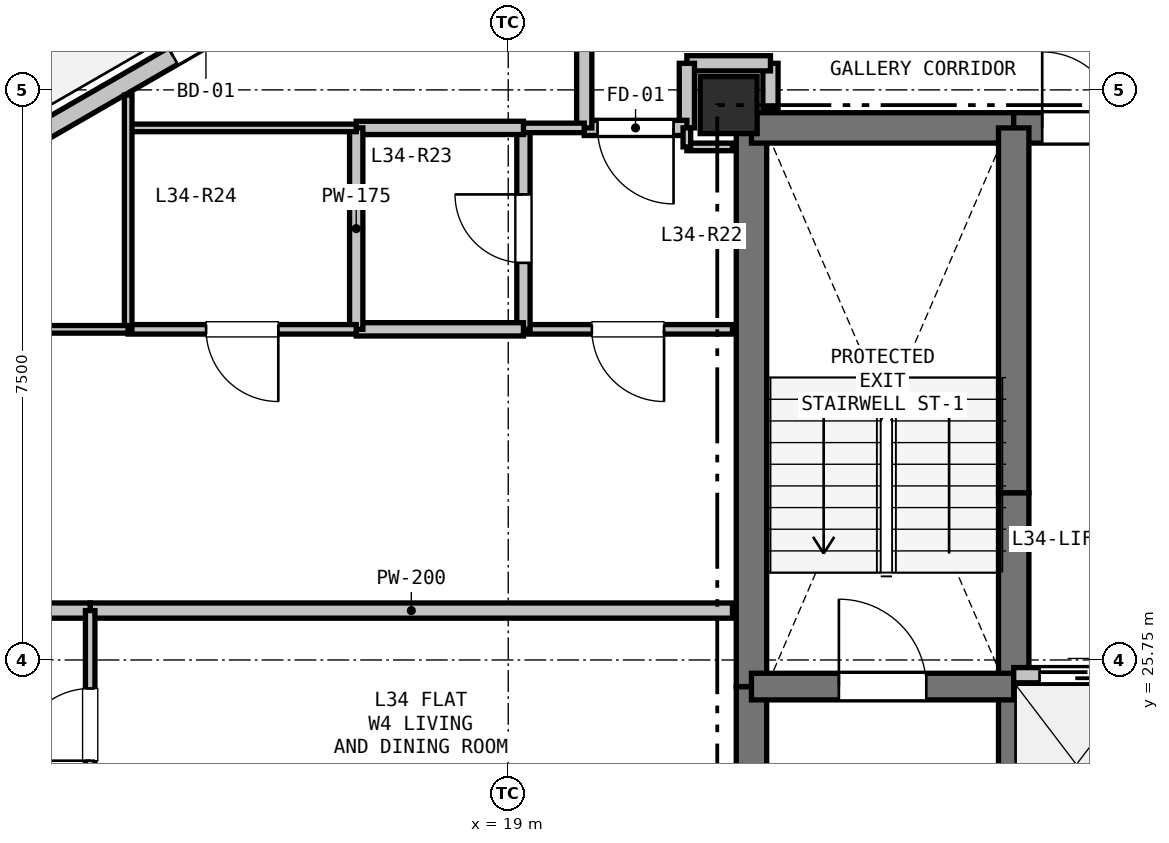
"""IFC4 building model, lengths in metres.
Left out: names, types, materials, properties, quantities, classifications, styles, units other than length and angle.
Written with IfcOpenShell. Run it as: python <this file> out.ifc"""

import sys

from ifc_helpers import new_model, si_unit, direction, frame, frame_2d, origin, origin_2d, place, context, subcontext, project, spatial, rectangle, extrude, element, fill, save


model = new_model("IFC4")
c1 = context("Model", 3, precision=1e-05, world=origin(), true_north=direction((0.0, 1.0)))
c2 = subcontext(c1, "Body", "Model", "MODEL_VIEW")
j1 = project(units=[si_unit("LENGTHUNIT", "METRE"), si_unit("PLANEANGLEUNIT", "RADIAN")], contexts=[c1])
p1 = place(None, origin())
s1 = spatial("IfcSite", under=j1, at=p1, CompositionType="ELEMENT")
p2 = place(p1, origin())
s2 = spatial("IfcBuilding", under=s1, at=p2, CompositionType="ELEMENT")
p3 = place(p2, frame((0.0, 0.0, 124.5)))
s3 = spatial("IfcBuildingStorey", under=s2, at=p3, CompositionType="ELEMENT", Elevation=124.5)
p4 = place(p3, frame((21.9, 33.05, 0.0), z_axis=(0.0, 0.0, 1.0), x_axis=(1.0, 0.0, 0.0)))
e1 = element("IfcColumn", 1, at=p4, inside=s3, PredefinedType="COLUMN", context=c2, shape_type="SweptSolid", body=[
    extrude(rectangle(XDim=0.75, YDim=0.75, at=origin_2d()), origin(), (0.0, 0.0, 1.0), 3.3),
])
p5 = place(p3, frame((6.69, 29.134, 0.0), z_axis=(0.0, 0.0, 1.0), x_axis=(0.866027848477, 0.499995765644, 0.0)))
e2 = element("IfcWall", 2, at=p5, inside=s3, PredefinedType="SOLIDWALL", context=c2, shape_type="SweptSolid", body=[
    extrude(rectangle(XDim=11.186, YDim=0.25, at=frame_2d((5.593, 0.0))), origin(), (0.0, 0.0, 1.0), 2.68),
])
p6 = place(p5, frame((9.122, 0.0, 0.0)))
e3 = element("IfcOpeningElement", 3, at=p6, cuts=e2, PredefinedType="OPENING", context=c2, shape_type="SweptSolid", body=[
    extrude(rectangle(XDim=1.0, YDim=2.1, at=frame_2d((0.5, 1.05))), frame((0.0, 0.135, 0.0), z_axis=(0.0, -1.0, 0.0), x_axis=(1.0, 0.0, 0.0)), (0.0, 0.0, 1.0), 0.27),
])
p7 = place(p5, frame((0.86, 0.0, 0.9)))
e4 = element("IfcOpeningElement", 4, at=p7, cuts=e2, PredefinedType="OPENING", context=c2, shape_type="SweptSolid", body=[
    extrude(rectangle(XDim=0.9, YDim=1.4, at=frame_2d((0.45, 0.7))), frame((0.0, 0.135, 0.0), z_axis=(0.0, -1.0, 0.0), x_axis=(1.0, 0.0, 0.0)), (0.0, 0.0, 1.0), 0.27),
])
p8 = place(p3, frame((16.378, 18.773, 0.0), z_axis=(0.0, 0.0, 1.0), x_axis=(-0.866027848477, 0.499995765644, 0.0)))
e5 = element("IfcWall", 5, at=p8, inside=s3, PredefinedType="SOLIDWALL", context=c2, shape_type="SweptSolid", body=[
    extrude(rectangle(XDim=11.186, YDim=0.25, at=frame_2d((5.593, 0.0))), origin(), (0.0, 0.0, 1.0), 2.68),
])
p9 = place(p8, frame((6.757, 0.0, 0.9)))
e6 = element("IfcOpeningElement", 6, at=p9, cuts=e5, PredefinedType="OPENING", context=c2, shape_type="SweptSolid", body=[
    extrude(rectangle(XDim=1.2, YDim=1.4, at=frame_2d((0.6, 0.7))), frame((0.0, 0.135, 0.0), z_axis=(0.0, -1.0, 0.0), x_axis=(1.0, 0.0, 0.0)), (0.0, 0.0, 1.0), 0.27),
])
p10 = place(p3, frame((22.2, 20.75, 0.0), z_axis=(0.0, 0.0, 1.0), x_axis=(0.0, 1.0, 0.0)))
e7 = element("IfcWall", 7, at=p10, inside=s3, PredefinedType="SHEAR", context=c2, shape_type="SweptSolid", body=[
    extrude(rectangle(XDim=4.65, YDim=0.4, at=frame_2d((2.325, 0.0))), origin(), (0.0, 0.0, 1.0), 3.06),
])
p11 = place(p3, frame((22.2, 25.4, 0.0), z_axis=(0.0, 0.0, 1.0), x_axis=(0.0, 1.0, 0.0)))
e8 = element("IfcWall", 8, at=p11, inside=s3, PredefinedType="SHEAR", context=c2, shape_type="SweptSolid", body=[
    extrude(rectangle(XDim=7.35, YDim=0.4, at=frame_2d((3.675, 0.0))), origin(), (0.0, 0.0, 1.0), 3.06),
])
p12 = place(p3, frame((22.2, 32.75, 0.0), z_axis=(0.0, 0.0, 1.0), x_axis=(1.0, 0.0, 0.0)))
e9 = element("IfcWall", 9, at=p12, inside=s3, PredefinedType="SHEAR", context=c2, shape_type="SweptSolid", body=[
    extrude(rectangle(XDim=3.45, YDim=0.4, at=frame_2d((1.725, 0.0))), origin(), (0.0, 0.0, 1.0), 3.06),
])
p13 = place(p3, frame((25.65, 32.75, 0.0), z_axis=(0.0, 0.0, 1.0), x_axis=(1.0, 0.0, 0.0)))
e10 = element("IfcWall", 10, at=p13, inside=s3, PredefinedType="SHEAR", context=c2, shape_type="SweptSolid", body=[
    extrude(rectangle(XDim=1.75, YDim=0.4, at=frame_2d((0.875, 0.0))), origin(), (0.0, 0.0, 1.0), 3.06),
])
p14 = place(p13, frame((0.375, 0.0, 0.0)))
e11 = element("IfcOpeningElement", 11, at=p14, cuts=e10, PredefinedType="OPENING", context=c2, shape_type="SweptSolid", body=[
    extrude(rectangle(XDim=1.0, YDim=2.15, at=frame_2d((0.5, 1.075))), frame((0.0, 0.21, 0.0), z_axis=(0.0, -1.0, 0.0), x_axis=(1.0, 0.0, 0.0)), (0.0, 0.0, 1.0), 0.42),
])
p15 = place(p3, frame((25.65, 22.75, 0.0), z_axis=(0.0, 0.0, 1.0), x_axis=(0.0, 1.0, 0.0)))
e12 = element("IfcWall", 12, at=p15, inside=s3, PredefinedType="SHEAR", context=c2, shape_type="SweptSolid", body=[
    extrude(rectangle(XDim=2.8, YDim=0.4, at=frame_2d((1.4, 0.0))), origin(), (0.0, 0.0, 1.0), 3.06),
])
p16 = place(p3, frame((25.65, 25.55, 0.0), z_axis=(0.0, 0.0, 1.0), x_axis=(0.0, 1.0, 0.0)))
e13 = element("IfcWall", 13, at=p16, inside=s3, PredefinedType="SHEAR", context=c2, shape_type="SweptSolid", body=[
    extrude(rectangle(XDim=2.4, YDim=0.4, at=frame_2d((1.2, 0.0))), origin(), (0.0, 0.0, 1.0), 3.06),
])
p17 = place(p3, frame((25.65, 27.95, 0.0), z_axis=(0.0, 0.0, 1.0), x_axis=(0.0, 1.0, 0.0)))
e14 = element("IfcWall", 14, at=p17, inside=s3, PredefinedType="SHEAR", context=c2, shape_type="SweptSolid", body=[
    extrude(rectangle(XDim=4.8, YDim=0.4, at=frame_2d((2.4, 0.0))), origin(), (0.0, 0.0, 1.0), 3.06),
])
p18 = place(p3, frame((22.2, 25.4, 0.0), z_axis=(0.0, 0.0, 1.0), x_axis=(1.0, 0.0, 0.0)))
e15 = element("IfcWall", 15, at=p18, inside=s3, PredefinedType="SHEAR", context=c2, shape_type="SweptSolid", body=[
    extrude(rectangle(XDim=3.45, YDim=0.35, at=frame_2d((1.725, 0.0))), origin(), (0.0, 0.0, 1.0), 3.06),
])
p19 = place(p18, frame((1.15, 0.0, 0.0)))
e16 = element("IfcOpeningElement", 16, at=p19, cuts=e15, PredefinedType="OPENING", context=c2, shape_type="SweptSolid", body=[
    extrude(rectangle(XDim=1.15, YDim=2.15, at=frame_2d((0.575, 1.075))), frame((0.0, 0.185, 0.0), z_axis=(0.0, -1.0, 0.0), x_axis=(1.0, 0.0, 0.0)), (0.0, 0.0, 1.0), 0.37),
])
p20 = place(p3, frame((25.65, 25.55, 0.0), z_axis=(0.0, 0.0, 1.0), x_axis=(1.0, 0.0, 0.0)))
e17 = element("IfcWall", 17, at=p20, inside=s3, PredefinedType="PARTITIONING", context=c2, shape_type="SweptSolid", body=[
    extrude(rectangle(XDim=4.95, YDim=0.2, at=frame_2d((2.475, 0.0))), origin(), (0.0, 0.0, 1.0), 3.06),
])
p21 = place(p20, frame((0.34, 0.0, 0.0)))
e18 = element("IfcOpeningElement", 18, at=p21, cuts=e17, PredefinedType="OPENING", context=c2, shape_type="SweptSolid", body=[
    extrude(rectangle(XDim=1.1, YDim=2.15, at=frame_2d((0.55, 1.075))), frame((0.0, 0.11, 0.0), z_axis=(0.0, -1.0, 0.0), x_axis=(1.0, 0.0, 0.0)), (0.0, 0.0, 1.0), 0.22),
])
p22 = place(p20, frame((1.99, 0.0, 0.0)))
e19 = element("IfcOpeningElement", 19, at=p22, cuts=e17, PredefinedType="OPENING", context=c2, shape_type="SweptSolid", body=[
    extrude(rectangle(XDim=1.1, YDim=2.15, at=frame_2d((0.55, 1.075))), frame((0.0, 0.11, 0.0), z_axis=(0.0, -1.0, 0.0), x_axis=(1.0, 0.0, 0.0)), (0.0, 0.0, 1.0), 0.22),
])
p23 = place(p20, frame((3.64, 0.0, 0.0)))
e20 = element("IfcOpeningElement", 20, at=p23, cuts=e17, PredefinedType="OPENING", context=c2, shape_type="SweptSolid", body=[
    extrude(rectangle(XDim=1.1, YDim=2.15, at=frame_2d((0.55, 1.075))), frame((0.0, 0.11, 0.0), z_axis=(0.0, -1.0, 0.0), x_axis=(1.0, 0.0, 0.0)), (0.0, 0.0, 1.0), 0.22),
])
p24 = place(p3, frame((22.45, 33.0, 0.0), z_axis=(0.0, 0.0, 1.0), x_axis=(0.0, 1.0, 0.0)))
e21 = element("IfcWall", 21, at=p24, inside=s3, PredefinedType="PARTITIONING", context=c2, shape_type="SweptSolid", body=[
    extrude(rectangle(XDim=0.6, YDim=0.2, at=frame_2d((0.3, 0.0))), origin(), (0.0, 0.0, 1.0), 2.508),
])
p25 = place(p3, frame((22.45, 33.6, 0.0), z_axis=(0.0, 0.0, 1.0), x_axis=(-1.0, 0.0, 0.0)))
e22 = element("IfcWall", 22, at=p25, inside=s3, PredefinedType="PARTITIONING", context=c2, shape_type="SweptSolid", body=[
    extrude(rectangle(XDim=1.1, YDim=0.2, at=frame_2d((0.55, 0.0))), origin(), (0.0, 0.0, 1.0), 3.06),
])
p26 = place(p3, frame((21.35, 33.6, 0.0), z_axis=(0.0, 0.0, 1.0), x_axis=(0.0, -1.0, 0.0)))
e23 = element("IfcWall", 23, at=p26, inside=s3, PredefinedType="PARTITIONING", context=c2, shape_type="SweptSolid", body=[
    extrude(rectangle(XDim=0.85, YDim=0.2, at=frame_2d((0.425, 0.0))), origin(), (0.0, 0.0, 1.0), 2.433),
])
p27 = place(p3, frame((21.35, 32.75, 0.0), z_axis=(0.0, 0.0, 1.0), x_axis=(-1.0, 0.0, 0.0)))
e24 = element("IfcWall", 24, at=p27, inside=s3, PredefinedType="PARTITIONING", context=c2, shape_type="SweptSolid", body=[
    extrude(rectangle(XDim=1.35, YDim=0.2, at=frame_2d((0.675, 0.0))), origin(), (0.0, 0.0, 1.0), 2.433),
])
p28 = place(p27, frame((0.175, 0.0, 0.0)))
e25 = element("IfcOpeningElement", 25, at=p28, cuts=e24, PredefinedType="OPENING", context=c2, shape_type="SweptSolid", body=[
    extrude(rectangle(XDim=1.0, YDim=2.15, at=frame_2d((0.5, 1.075))), frame((0.0, 0.11, 0.0), z_axis=(0.0, -1.0, 0.0), x_axis=(1.0, 0.0, 0.0)), (0.0, 0.0, 1.0), 0.22),
])
p29 = place(p3, frame((20.0, 32.75, 0.0), z_axis=(0.0, 0.0, 1.0), x_axis=(0.0, 1.0, 0.0)))
e26 = element("IfcWall", 26, at=p29, inside=s3, PredefinedType="PARTITIONING", context=c2, shape_type="SweptSolid", body=[
    extrude(rectangle(XDim=2.6, YDim=0.2, at=frame_2d((1.3, 0.0))), origin(), (0.0, 0.0, 1.0), 2.433),
])
p30 = place(p3, frame((21.35, 32.5, 0.0), z_axis=(0.0, 0.0, 1.0), x_axis=(1.0, 0.0, 0.0)))
e27 = element("IfcWall", 27, at=p30, inside=s3, PredefinedType="PARTITIONING", context=c2, shape_type="SweptSolid", body=[
    extrude(rectangle(XDim=0.6, YDim=0.1, at=frame_2d((0.3, 0.0))), origin(), (0.0, 0.0, 1.0), 2.508),
])
p31 = place(p3, frame((21.95, 30.1, 0.0), z_axis=(0.0, 0.0, 1.0), x_axis=(-1.0, 0.0, 0.0)))
e28 = element("IfcWall", 28, at=p31, inside=s3, PredefinedType="PARTITIONING", context=c2, shape_type="SweptSolid", body=[
    extrude(rectangle(XDim=2.75, YDim=0.125, at=frame_2d((1.375, 0.0))), origin(), (0.0, 0.0, 1.0), 2.508),
])
p32 = place(p31, frame((0.9, 0.0, 0.0)))
e29 = element("IfcOpeningElement", 29, at=p32, cuts=e28, PredefinedType="OPENING", context=c2, shape_type="SweptSolid", body=[
    extrude(rectangle(XDim=0.95, YDim=2.1, at=frame_2d((0.475, 1.05))), frame((0.0, 0.073, 0.0), z_axis=(0.0, -1.0, 0.0), x_axis=(1.0, 0.0, 0.0)), (0.0, 0.0, 1.0), 0.145),
])
p33 = place(p3, frame((19.2, 30.1, 0.0), z_axis=(0.0, 0.0, 1.0), x_axis=(0.0, 1.0, 0.0)))
e30 = element("IfcWall", 30, at=p33, inside=s3, PredefinedType="PLUMBINGWALL", context=c2, shape_type="SweptSolid", body=[
    extrude(rectangle(XDim=2.65, YDim=0.175, at=frame_2d((1.325, 0.0))), origin(), (0.0, 0.0, 1.0), 2.433),
])
p34 = place(p33, frame((0.875, 0.0, 0.0)))
e31 = element("IfcOpeningElement", 31, at=p34, cuts=e30, PredefinedType="OPENING", context=c2, shape_type="SweptSolid", body=[
    extrude(rectangle(XDim=0.9, YDim=2.1, at=frame_2d((0.45, 1.05))), frame((0.0, 0.097, 0.0), z_axis=(0.0, -1.0, 0.0), x_axis=(1.0, 0.0, 0.0)), (0.0, 0.0, 1.0), 0.195),
])
p35 = place(p3, frame((19.2, 32.75, 0.0), z_axis=(0.0, 0.0, 1.0), x_axis=(1.0, 0.0, 0.0)))
e32 = element("IfcWall", 32, at=p35, inside=s3, PredefinedType="PARTITIONING", context=c2, shape_type="SweptSolid", body=[
    extrude(rectangle(XDim=0.8, YDim=0.125, at=frame_2d((0.4, 0.0))), origin(), (0.0, 0.0, 1.0), 2.433),
])
p36 = place(p3, frame((21.35, 32.75, 0.0), z_axis=(0.0, 0.0, 1.0), x_axis=(0.0, -1.0, 0.0)))
e33 = element("IfcWall", 33, at=p36, inside=s3, PredefinedType="PARTITIONING", context=c2, shape_type="SweptSolid", body=[
    extrude(rectangle(XDim=0.25, YDim=0.1, at=frame_2d((0.125, 0.0))), origin(), (0.0, 0.0, 1.0), 3.06),
])
p37 = place(p3, frame((17.0, 32.75, 0.0), z_axis=(0.0, 0.0, 1.0), x_axis=(1.0, 0.0, 0.0)))
e34 = element("IfcWall", 34, at=p37, inside=s3, PredefinedType="PLUMBINGWALL", context=c2, shape_type="SweptSolid", body=[
    extrude(rectangle(XDim=2.2, YDim=0.175, at=frame_2d((1.1, 0.0))), origin(), (0.0, 0.0, 1.0), 2.433),
])
p38 = place(p3, frame((19.2, 30.1, 0.0), z_axis=(0.0, 0.0, 1.0), x_axis=(-1.0, 0.0, 0.0)))
e35 = element("IfcWall", 35, at=p38, inside=s3, PredefinedType="PLUMBINGWALL", context=c2, shape_type="SweptSolid", body=[
    extrude(rectangle(XDim=2.2, YDim=0.175, at=frame_2d((1.1, 0.0))), origin(), (0.0, 0.0, 1.0), 3.06),
])
p39 = place(p3, frame((17.0, 30.1, 0.0), z_axis=(0.0, 0.0, 1.0), x_axis=(0.0, 1.0, 0.0)))
e36 = element("IfcWall", 36, at=p39, inside=s3, PredefinedType="PLUMBINGWALL", context=c2, shape_type="SweptSolid", body=[
    extrude(rectangle(XDim=2.65, YDim=0.175, at=frame_2d((1.325, 0.0))), origin(), (0.0, 0.0, 1.0), 2.433),
])
p40 = place(p3, frame((14.0, 32.75, 0.0), z_axis=(0.0, 0.0, 1.0), x_axis=(1.0, 0.0, 0.0)))
e37 = element("IfcWall", 37, at=p40, inside=s3, PredefinedType="PARTITIONING", context=c2, shape_type="SweptSolid", body=[
    extrude(rectangle(XDim=3.0, YDim=0.1, at=frame_2d((1.5, 0.0))), origin(), (0.0, 0.0, 1.0), 2.365),
])
p41 = place(p3, frame((17.0, 30.1, 0.0), z_axis=(0.0, 0.0, 1.0), x_axis=(-1.0, 0.0, 0.0)))
e38 = element("IfcWall", 38, at=p41, inside=s3, PredefinedType="PARTITIONING", context=c2, shape_type="SweptSolid", body=[
    extrude(rectangle(XDim=3.0, YDim=0.125, at=frame_2d((1.5, 0.0))), origin(), (0.0, 0.0, 1.0), 3.06),
])
p42 = place(p41, frame((1.025, 0.0, 0.0)))
e39 = element("IfcOpeningElement", 39, at=p42, cuts=e38, PredefinedType="OPENING", context=c2, shape_type="SweptSolid", body=[
    extrude(rectangle(XDim=0.95, YDim=2.1, at=frame_2d((0.475, 1.05))), frame((0.0, 0.073, 0.0), z_axis=(0.0, -1.0, 0.0), x_axis=(1.0, 0.0, 0.0)), (0.0, 0.0, 1.0), 0.145),
])
p43 = place(p3, frame((14.0, 30.1, 0.0), z_axis=(0.0, 0.0, 1.0), x_axis=(0.0, 1.0, 0.0)))
e40 = element("IfcWall", 40, at=p43, inside=s3, PredefinedType="PARTITIONING", context=c2, shape_type="SweptSolid", body=[
    extrude(rectangle(XDim=3.082, YDim=0.1, at=frame_2d((1.541, 0.0))), origin(), (0.0, 0.0, 1.0), 2.365),
])
p44 = place(p3, frame((8.635, 30.1, 0.0), z_axis=(0.0, 0.0, 1.0), x_axis=(1.0, 0.0, 0.0)))
e41 = element("IfcWall", 41, at=p44, inside=s3, PredefinedType="PARTITIONING", context=c2, shape_type="SweptSolid", body=[
    extrude(rectangle(XDim=5.365, YDim=0.1, at=frame_2d((2.683, 0.0))), origin(), (0.0, 0.0, 1.0), 2.725),
])
p45 = place(p3, frame((21.95, 26.4, 0.0), z_axis=(0.0, 0.0, 1.0), x_axis=(-1.0, 0.0, 0.0)))
e42 = element("IfcWall", 42, at=p45, inside=s3, PredefinedType="PARTITIONING", context=c2, shape_type="SweptSolid", body=[
    extrude(rectangle(XDim=8.45, YDim=0.2, at=frame_2d((4.225, 0.0))), origin(), (0.0, 0.0, 1.0), 2.508),
])
p46 = place(p3, frame((13.5, 26.4, 0.0), z_axis=(0.0, 0.0, 1.0), x_axis=(-1.0, 0.0, 0.0)))
e43 = element("IfcWall", 43, at=p46, inside=s3, PredefinedType="PARTITIONING", context=c2, shape_type="SweptSolid", body=[
    extrude(rectangle(XDim=6.791, YDim=0.2, at=frame_2d((3.396, 0.0))), origin(), (0.0, 0.0, 1.0), 2.725),
])
p47 = place(p3, frame((13.5, 23.4, 0.0), z_axis=(0.0, 0.0, 1.0), x_axis=(0.0, 1.0, 0.0)))
e44 = element("IfcWall", 44, at=p47, inside=s3, PredefinedType="PARTITIONING", context=c2, shape_type="SweptSolid", body=[
    extrude(rectangle(XDim=3.0, YDim=0.125, at=frame_2d((1.5, 0.0))), origin(), (0.0, 0.0, 1.0), 3.06),
])
p48 = place(p47, frame((1.025, 0.0, 0.0)))
e45 = element("IfcOpeningElement", 45, at=p48, cuts=e44, PredefinedType="OPENING", context=c2, shape_type="SweptSolid", body=[
    extrude(rectangle(XDim=0.95, YDim=2.1, at=frame_2d((0.475, 1.05))), frame((0.0, 0.073, 0.0), z_axis=(0.0, -1.0, 0.0), x_axis=(1.0, 0.0, 0.0)), (0.0, 0.0, 1.0), 0.145),
])
p49 = place(p6, origin())
e46 = element("IfcDoor", 46, at=p49, inside=s3, OperationType="SINGLE_SWING_LEFT", PredefinedType="DOOR", context=c2, shape_type="SweptSolid", body=[
    extrude(rectangle(XDim=1.0, YDim=2.1, at=frame_2d((0.5, 1.05))), frame((0.0, 0.025, 0.0), z_axis=(0.0, -1.0, 0.0), x_axis=(1.0, 0.0, 0.0)), (0.0, 0.0, 1.0), 0.05),
])
fill(e3, e46)
p50 = place(p21, origin())
e47 = element("IfcDoor", 47, at=p50, inside=s3, OperationType="SLIDING_TO_LEFT", PredefinedType="DOOR", context=c2, shape_type="SweptSolid", body=[
    extrude(rectangle(XDim=1.1, YDim=2.15, at=frame_2d((0.55, 1.075))), frame((0.0, 0.025, 0.0), z_axis=(0.0, -1.0, 0.0), x_axis=(1.0, 0.0, 0.0)), (0.0, 0.0, 1.0), 0.05),
])
fill(e18, e47)
p51 = place(p14, origin())
e48 = element("IfcDoor", 48, at=p51, inside=s3, OperationType="SINGLE_SWING_LEFT", PredefinedType="DOOR", context=c2, shape_type="SweptSolid", body=[
    extrude(rectangle(XDim=1.0, YDim=2.15, at=frame_2d((0.5, 1.075))), frame((0.0, 0.025, 0.0), z_axis=(0.0, -1.0, 0.0), x_axis=(1.0, 0.0, 0.0)), (0.0, 0.0, 1.0), 0.05),
])
fill(e11, e48)
p52 = place(p19, origin())
e49 = element("IfcDoor", 49, at=p52, inside=s3, OperationType="SINGLE_SWING_LEFT", PredefinedType="DOOR", context=c2, shape_type="SweptSolid", body=[
    extrude(rectangle(XDim=1.15, YDim=2.15, at=frame_2d((0.575, 1.075))), frame((0.0, 0.025, 0.0), z_axis=(0.0, -1.0, 0.0), x_axis=(1.0, 0.0, 0.0)), (0.0, 0.0, 1.0), 0.05),
])
fill(e16, e49)
p53 = place(p28, origin())
e50 = element("IfcDoor", 50, at=p53, inside=s3, OperationType="SINGLE_SWING_LEFT", PredefinedType="DOOR", context=c2, shape_type="SweptSolid", body=[
    extrude(rectangle(XDim=1.0, YDim=2.15, at=frame_2d((0.5, 1.075))), frame((0.0, 0.025, 0.0), z_axis=(0.0, -1.0, 0.0), x_axis=(1.0, 0.0, 0.0)), (0.0, 0.0, 1.0), 0.05),
])
fill(e25, e50)
p54 = place(p34, origin())
e51 = element("IfcDoor", 51, at=p54, inside=s3, OperationType="SINGLE_SWING_RIGHT", PredefinedType="DOOR", context=c2, shape_type="SweptSolid", body=[
    extrude(rectangle(XDim=0.9, YDim=2.1, at=frame_2d((0.45, 1.05))), frame((0.0, 0.025, 0.0), z_axis=(0.0, -1.0, 0.0), x_axis=(1.0, 0.0, 0.0)), (0.0, 0.0, 1.0), 0.05),
])
fill(e31, e51)
p55 = place(p32, origin())
e52 = element("IfcDoor", 52, at=p55, inside=s3, OperationType="SINGLE_SWING_LEFT", PredefinedType="DOOR", context=c2, shape_type="SweptSolid", body=[
    extrude(rectangle(XDim=0.95, YDim=2.1, at=frame_2d((0.475, 1.05))), frame((0.0, 0.025, 0.0), z_axis=(0.0, -1.0, 0.0), x_axis=(1.0, 0.0, 0.0)), (0.0, 0.0, 1.0), 0.05),
])
fill(e29, e52)
p56 = place(p42, origin())
e53 = element("IfcDoor", 53, at=p56, inside=s3, OperationType="SINGLE_SWING_LEFT", PredefinedType="DOOR", context=c2, shape_type="SweptSolid", body=[
    extrude(rectangle(XDim=0.95, YDim=2.1, at=frame_2d((0.475, 1.05))), frame((0.0, 0.025, 0.0), z_axis=(0.0, -1.0, 0.0), x_axis=(1.0, 0.0, 0.0)), (0.0, 0.0, 1.0), 0.05),
])
fill(e39, e53)
p57 = place(p48, origin())
e54 = element("IfcDoor", 54, at=p57, inside=s3, OperationType="SINGLE_SWING_LEFT", PredefinedType="DOOR", context=c2, shape_type="SweptSolid", body=[
    extrude(rectangle(XDim=0.95, YDim=2.1, at=frame_2d((0.475, 1.05))), frame((0.0, 0.025, 0.0), z_axis=(0.0, -1.0, 0.0), x_axis=(1.0, 0.0, 0.0)), (0.0, 0.0, 1.0), 0.05),
])
fill(e45, e54)
save(model, sys.argv[1])
